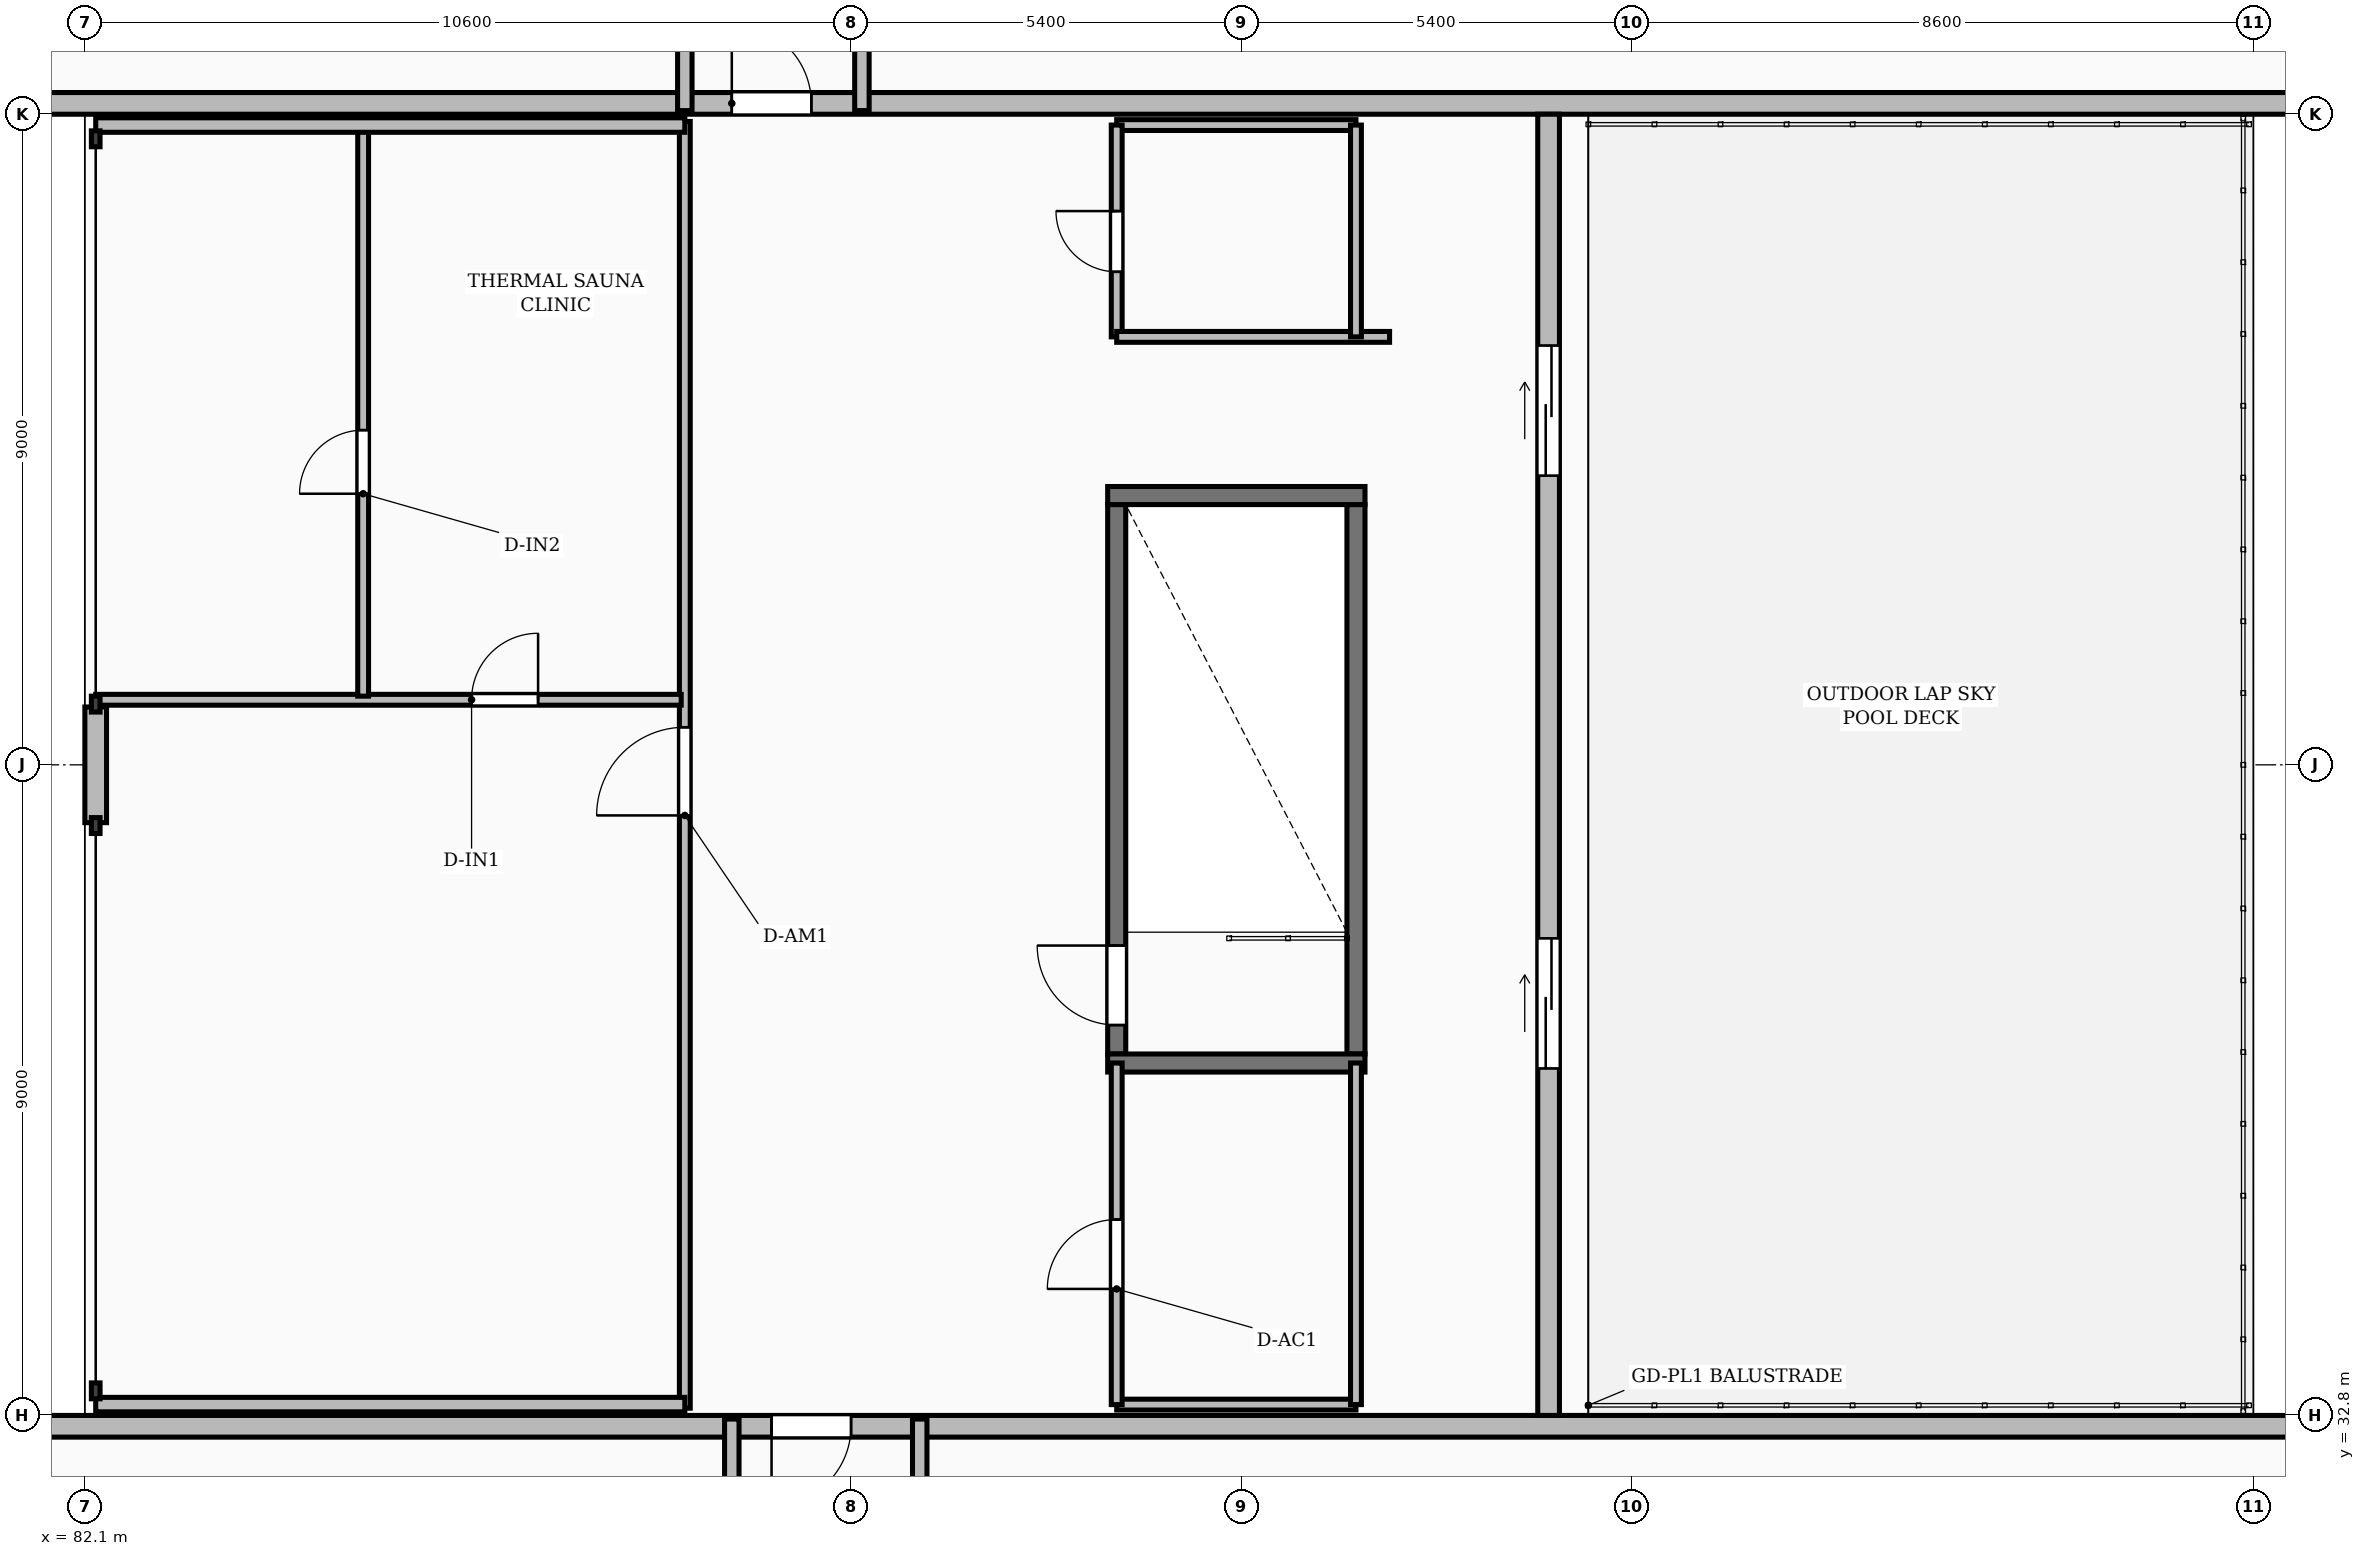
"""IFC4 building model, lengths in metres.
Left out: names, types, materials, properties, quantities, classifications, styles, units other than length and angle.
Written with IfcOpenShell. Run it as: python <this file> out.ifc"""

import sys

from ifc_helpers import new_model, si_unit, direction, frame, frame_2d, origin, place, context, subcontext, project, spatial, rectangle, extrude, element, fill, save


model = new_model("IFC4")
c1 = context("Model", 3, precision=1e-05, world=origin(), true_north=direction((0.0, 1.0)))
c2 = subcontext(c1, "Body", "Model", "MODEL_VIEW")
j1 = project(units=[si_unit("LENGTHUNIT", "METRE"), si_unit("PLANEANGLEUNIT", "RADIAN")], contexts=[c1])
p1 = place(None, origin())
s1 = spatial("IfcSite", under=j1, at=p1, CompositionType="ELEMENT")
p2 = place(p1, origin())
s2 = spatial("IfcBuilding", under=s1, at=p2, CompositionType="ELEMENT")
p3 = place(p2, frame((0.0, 0.0, 153.7)))
s3 = spatial("IfcBuildingStorey", under=s2, at=p3, CompositionType="ELEMENT", Elevation=153.7)
p4 = place(p3, frame((57.6, 50.95, 0.0), z_axis=(0.0, 0.0, 1.0), x_axis=(1.0, 0.0, 0.0)))
e1 = element("IfcWall", 1, at=p4, inside=s3, PredefinedType="STANDARD", context=c2, shape_type="SweptSolid", body=[
    extrude(rectangle(XDim=73.0, YDim=0.3, at=frame_2d((36.5, 0.0))), origin(), (0.0, 0.0, 1.0), 3.32),
])
p5 = place(p4, frame((15.225, 0.0, 0.85)))
e2 = element("IfcOpeningElement", 2, at=p5, cuts=e1, PredefinedType="OPENING", context=c2, shape_type="SweptSolid", body=[
    extrude(rectangle(XDim=1.8, YDim=1.8, at=frame_2d((0.9, 0.9))), frame((0.0, 0.16, 0.0), z_axis=(0.0, -1.0, 0.0), x_axis=(1.0, 0.0, 0.0)), (0.0, 0.0, 1.0), 0.32),
])
p6 = place(p4, frame((58.575, 0.0, 0.85)))
e3 = element("IfcOpeningElement", 3, at=p6, cuts=e1, PredefinedType="OPENING", context=c2, shape_type="SweptSolid", body=[
    extrude(rectangle(XDim=1.8, YDim=1.8, at=frame_2d((0.9, 0.9))), frame((0.0, 0.16, 0.0), z_axis=(0.0, -1.0, 0.0), x_axis=(1.0, 0.0, 0.0)), (0.0, 0.0, 1.0), 0.32),
])
p7 = place(p4, frame((33.45, 0.0, 0.0)))
e4 = element("IfcOpeningElement", 4, at=p7, cuts=e1, PredefinedType="OPENING", context=c2, shape_type="SweptSolid", body=[
    extrude(rectangle(XDim=1.1, YDim=2.1, at=frame_2d((0.55, 1.05))), frame((0.0, 0.16, 0.0), z_axis=(0.0, -1.0, 0.0), x_axis=(1.0, 0.0, 0.0)), (0.0, 0.0, 1.0), 0.32),
])
p8 = place(p3, frame((130.7, 32.65, 0.0), z_axis=(0.0, 0.0, 1.0), x_axis=(-1.0, 0.0, 0.0)))
e5 = element("IfcWall", 5, at=p8, inside=s3, PredefinedType="STANDARD", context=c2, shape_type="SweptSolid", body=[
    extrude(rectangle(XDim=58.0, YDim=0.3, at=frame_2d((29.0, 0.0))), origin(), (0.0, 0.0, 1.0), 3.32),
])
p9 = place(p8, frame((50.125, 0.0, 0.85)))
e6 = element("IfcOpeningElement", 6, at=p9, cuts=e5, PredefinedType="OPENING", context=c2, shape_type="SweptSolid", body=[
    extrude(rectangle(XDim=1.8, YDim=1.8, at=frame_2d((0.9, 0.9))), frame((0.0, 0.16, 0.0), z_axis=(0.0, -1.0, 0.0), x_axis=(1.0, 0.0, 0.0)), (0.0, 0.0, 1.0), 0.32),
])
p10 = place(p8, frame((6.775, 0.0, 0.85)))
e7 = element("IfcOpeningElement", 7, at=p10, cuts=e5, PredefinedType="OPENING", context=c2, shape_type="SweptSolid", body=[
    extrude(rectangle(XDim=1.8, YDim=1.8, at=frame_2d((0.9, 0.9))), frame((0.0, 0.16, 0.0), z_axis=(0.0, -1.0, 0.0), x_axis=(1.0, 0.0, 0.0)), (0.0, 0.0, 1.0), 0.32),
])
p11 = place(p8, frame((38.0, 0.0, 0.0)))
e8 = element("IfcOpeningElement", 8, at=p11, cuts=e5, PredefinedType="OPENING", context=c2, shape_type="SweptSolid", body=[
    extrude(rectangle(XDim=1.1, YDim=2.1, at=frame_2d((0.55, 1.05))), frame((0.0, 0.16, 0.0), z_axis=(0.0, -1.0, 0.0), x_axis=(1.0, 0.0, 0.0)), (0.0, 0.0, 1.0), 0.32),
])
p12 = place(p3, frame((82.25, 41.0, 0.0), z_axis=(0.0, 0.0, 1.0), x_axis=(0.0, 1.0, 0.0)))
e9 = element("IfcWall", 9, at=p12, inside=s3, PredefinedType="STANDARD", context=c2, shape_type="SweptSolid", body=[
    extrude(rectangle(XDim=1.6, YDim=0.3, at=frame_2d((0.8, 0.0))), origin(), (0.0, 0.0, 1.0), 2.39),
])
p13 = place(p3, frame((102.35, 32.8, 0.0), z_axis=(0.0, 0.0, 1.0), x_axis=(0.0, 1.0, 0.0)))
e10 = element("IfcWall", 10, at=p13, inside=s3, PredefinedType="STANDARD", context=c2, shape_type="SweptSolid", body=[
    extrude(rectangle(XDim=18.0, YDim=0.3, at=frame_2d((9.0, 0.0))), origin(), (0.0, 0.0, 1.0), 3.32),
])
p14 = place(p13, frame((4.8, 0.0, 0.0)))
e11 = element("IfcOpeningElement", 11, at=p14, cuts=e10, PredefinedType="OPENING", context=c2, shape_type="SweptSolid", body=[
    extrude(rectangle(XDim=1.8, YDim=2.3, at=frame_2d((0.9, 1.15))), frame((0.0, 0.16, 0.0), z_axis=(0.0, -1.0, 0.0), x_axis=(1.0, 0.0, 0.0)), (0.0, 0.0, 1.0), 0.32),
])
p15 = place(p13, frame((13.0, 0.0, 0.0)))
e12 = element("IfcOpeningElement", 12, at=p15, cuts=e10, PredefinedType="OPENING", context=c2, shape_type="SweptSolid", body=[
    extrude(rectangle(XDim=1.8, YDim=2.3, at=frame_2d((0.9, 1.15))), frame((0.0, 0.16, 0.0), z_axis=(0.0, -1.0, 0.0), x_axis=(1.0, 0.0, 0.0)), (0.0, 0.0, 1.0), 0.32),
])
for number, where, z_axis, x_axis in (
    (13, (90.4, 50.85, 0.0), (0.0, 0.0, 1.0), (0.0, 1.0, 0.0)),
    (14, (92.85, 50.85, 0.0), (0.0, 0.0, 1.0), (0.0, 1.0, 0.0)),
):
    element("IfcWall", number, at=place(p3, frame(where, z_axis=z_axis, x_axis=x_axis)), inside=s3, PredefinedType="PARTITIONING", context=c2, shape_type="SweptSolid", body=[
        extrude(rectangle(XDim=4.2, YDim=0.2, at=frame_2d((2.1, 0.0))), origin(), (0.0, 0.0, 1.0), 3.32),
    ])
p16 = place(p3, frame((91.05, 30.55, 0.0), z_axis=(0.0, 0.0, 1.0), x_axis=(0.0, 1.0, 0.0)))
e15 = element("IfcWall", 15, at=p16, inside=s3, PredefinedType="PARTITIONING", context=c2, shape_type="SweptSolid", body=[
    extrude(rectangle(XDim=2.2, YDim=0.2, at=frame_2d((1.1, 0.0))), origin(), (0.0, 0.0, 1.0), 3.32),
])
p17 = place(p3, frame((93.65, 30.55, 0.0), z_axis=(0.0, 0.0, 1.0), x_axis=(0.0, 1.0, 0.0)))
e16 = element("IfcWall", 16, at=p17, inside=s3, PredefinedType="PARTITIONING", context=c2, shape_type="SweptSolid", body=[
    extrude(rectangle(XDim=2.2, YDim=0.2, at=frame_2d((1.1, 0.0))), origin(), (0.0, 0.0, 1.0), 2.394),
])
p18 = place(p3, frame((96.375, 37.8, 0.0), z_axis=(0.0, 0.0, 1.0), x_axis=(0.0, 1.0, 0.0)))
e17 = element("IfcWall", 17, at=p18, inside=s3, PredefinedType="SHEAR", context=c2, shape_type="SweptSolid", body=[
    extrude(rectangle(XDim=7.6, YDim=0.25, at=frame_2d((3.8, 0.0))), origin(), (0.0, 0.0, 1.0), 3.6),
])
p19 = place(p18, frame((0.4, 0.0, 0.0)))
e18 = element("IfcOpeningElement", 18, at=p19, cuts=e17, PredefinedType="OPENING", context=c2, shape_type="SweptSolid", body=[
    extrude(rectangle(XDim=1.1, YDim=2.1, at=frame_2d((0.55, 1.05))), frame((0.0, 0.135, 0.0), z_axis=(0.0, -1.0, 0.0), x_axis=(1.0, 0.0, 0.0)), (0.0, 0.0, 1.0), 0.27),
])
p20 = place(p3, frame((99.685, 37.8, 0.0), z_axis=(0.0, 0.0, 1.0), x_axis=(0.0, 1.0, 0.0)))
e19 = element("IfcWall", 19, at=p20, inside=s3, PredefinedType="SHEAR", context=c2, shape_type="SweptSolid", body=[
    extrude(rectangle(XDim=7.6, YDim=0.25, at=frame_2d((3.8, 0.0))), origin(), (0.0, 0.0, 1.0), 3.6),
])
for number, where, z_axis, x_axis in (
    (20, (96.25, 37.675, 0.0), (0.0, 0.0, 1.0), (1.0, 0.0, 0.0)),
    (21, (96.25, 45.525, 0.0), (0.0, 0.0, 1.0), (1.0, 0.0, 0.0)),
):
    element("IfcWall", number, at=place(p3, frame(where, z_axis=z_axis, x_axis=x_axis)), inside=s3, PredefinedType="SHEAR", context=c2, shape_type="SweptSolid", body=[
        extrude(rectangle(XDim=3.56, YDim=0.25, at=frame_2d((1.78, 0.0))), origin(), (0.0, 0.0, 1.0), 3.6),
    ])
for number, where, z_axis, x_axis in (
    (22, (96.375, 32.95, 0.0), (0.0, 0.0, 1.0), (1.0, 0.0, 0.0)),
    (23, (96.375, 50.65, 0.0), (0.0, 0.0, 1.0), (1.0, 0.0, 0.0)),
):
    element("IfcWall", number, at=place(p3, frame(where, z_axis=z_axis, x_axis=x_axis)), inside=s3, PredefinedType="PARTITIONING", context=c2, shape_type="SweptSolid", body=[
        extrude(rectangle(XDim=3.31, YDim=0.15, at=frame_2d((1.655, 0.0))), origin(), (0.0, 0.0, 1.0), 2.7),
    ])
p21 = place(p3, frame((96.375, 32.95, 0.0), z_axis=(0.0, 0.0, 1.0), x_axis=(0.0, 1.0, 0.0)))
e24 = element("IfcWall", 24, at=p21, inside=s3, PredefinedType="PARTITIONING", context=c2, shape_type="SweptSolid", body=[
    extrude(rectangle(XDim=4.725, YDim=0.15, at=frame_2d((2.363, 0.0))), origin(), (0.0, 0.0, 1.0), 2.394),
])
p22 = place(p21, frame((1.6, 0.0, 0.0)))
e25 = element("IfcOpeningElement", 25, at=p22, cuts=e24, PredefinedType="OPENING", context=c2, shape_type="SweptSolid", body=[
    extrude(rectangle(XDim=0.96, YDim=2.1, at=frame_2d((0.48, 1.05))), frame((0.0, 0.085, 0.0), z_axis=(0.0, -1.0, 0.0), x_axis=(1.0, 0.0, 0.0)), (0.0, 0.0, 1.0), 0.17),
])
p23 = place(p3, frame((96.375, 47.72, 0.0), z_axis=(0.0, 0.0, 1.0), x_axis=(0.0, 1.0, 0.0)))
e26 = element("IfcWall", 26, at=p23, inside=s3, PredefinedType="PARTITIONING", context=c2, shape_type="SweptSolid", body=[
    extrude(rectangle(XDim=2.93, YDim=0.15, at=frame_2d((1.465, 0.0))), origin(), (0.0, 0.0, 1.0), 2.394),
])
p24 = place(p23, frame((0.9, 0.0, 0.0)))
e27 = element("IfcOpeningElement", 27, at=p24, cuts=e26, PredefinedType="OPENING", context=c2, shape_type="SweptSolid", body=[
    extrude(rectangle(XDim=0.84, YDim=2.04, at=frame_2d((0.42, 1.02))), frame((0.0, 0.085, 0.0), z_axis=(0.0, -1.0, 0.0), x_axis=(1.0, 0.0, 0.0)), (0.0, 0.0, 1.0), 0.17),
])
p25 = place(p3, frame((96.375, 47.72, 0.0), z_axis=(0.0, 0.0, 1.0), x_axis=(1.0, 0.0, 0.0)))
e28 = element("IfcWall", 28, at=p25, inside=s3, PredefinedType="PARTITIONING", context=c2, shape_type="SweptSolid", body=[
    extrude(rectangle(XDim=3.775, YDim=0.15, at=frame_2d((1.887, 0.0))), origin(), (0.0, 0.0, 1.0), 3.32),
])
p26 = place(p3, frame((99.685, 32.95, 0.0), z_axis=(0.0, 0.0, 1.0), x_axis=(0.0, 1.0, 0.0)))
e29 = element("IfcWall", 29, at=p26, inside=s3, PredefinedType="PARTITIONING", context=c2, shape_type="SweptSolid", body=[
    extrude(rectangle(XDim=4.725, YDim=0.15, at=frame_2d((2.363, 0.0))), origin(), (0.0, 0.0, 1.0), 2.394),
])
p27 = place(p3, frame((99.685, 47.72, 0.0), z_axis=(0.0, 0.0, 1.0), x_axis=(0.0, 1.0, 0.0)))
e30 = element("IfcWall", 30, at=p27, inside=s3, PredefinedType="PARTITIONING", context=c2, shape_type="SweptSolid", body=[
    extrude(rectangle(XDim=2.93, YDim=0.15, at=frame_2d((1.465, 0.0))), origin(), (0.0, 0.0, 1.0), 2.394),
])
p28 = place(p3, frame((90.4, 32.9, 0.0), z_axis=(0.0, 0.0, 1.0), x_axis=(0.0, 1.0, 0.0)))
e31 = element("IfcWall", 31, at=p28, inside=s3, PredefinedType="PARTITIONING", context=c2, shape_type="SweptSolid", body=[
    extrude(rectangle(XDim=17.8, YDim=0.15, at=frame_2d((8.9, 0.0))), origin(), (0.0, 0.0, 1.0), 3.32),
])
p29 = place(p28, frame((8.2, 0.0, 0.0)))
e32 = element("IfcOpeningElement", 32, at=p29, cuts=e31, PredefinedType="OPENING", context=c2, shape_type="SweptSolid", body=[
    extrude(rectangle(XDim=1.22, YDim=2.18, at=frame_2d((0.61, 1.09))), frame((0.0, 0.085, 0.0), z_axis=(0.0, -1.0, 0.0), x_axis=(1.0, 0.0, 0.0)), (0.0, 0.0, 1.0), 0.17),
])
p30 = place(p3, frame((82.25, 42.7, 0.0), z_axis=(0.0, 0.0, 1.0), x_axis=(1.0, 0.0, 0.0)))
e33 = element("IfcWall", 33, at=p30, inside=s3, PredefinedType="PARTITIONING", context=c2, shape_type="SweptSolid", body=[
    extrude(rectangle(XDim=8.1, YDim=0.15, at=frame_2d((4.05, 0.0))), origin(), (0.0, 0.0, 1.0), 3.32),
])
p31 = place(p30, frame((5.2, 0.0, 0.0)))
e34 = element("IfcOpeningElement", 34, at=p31, cuts=e33, PredefinedType="OPENING", context=c2, shape_type="SweptSolid", body=[
    extrude(rectangle(XDim=0.92, YDim=2.08, at=frame_2d((0.46, 1.04))), frame((0.0, 0.085, 0.0), z_axis=(0.0, -1.0, 0.0), x_axis=(1.0, 0.0, 0.0)), (0.0, 0.0, 1.0), 0.17),
])
p32 = place(p3, frame((85.95, 42.75, 0.0), z_axis=(0.0, 0.0, 1.0), x_axis=(0.0, 1.0, 0.0)))
e35 = element("IfcWall", 35, at=p32, inside=s3, PredefinedType="PARTITIONING", context=c2, shape_type="SweptSolid", body=[
    extrude(rectangle(XDim=7.9, YDim=0.15, at=frame_2d((3.95, 0.0))), origin(), (0.0, 0.0, 1.0), 3.32),
])
p33 = place(p32, frame((2.8, 0.0, 0.0)))
e36 = element("IfcOpeningElement", 36, at=p33, cuts=e35, PredefinedType="OPENING", context=c2, shape_type="SweptSolid", body=[
    extrude(rectangle(XDim=0.88, YDim=2.06, at=frame_2d((0.44, 1.03))), frame((0.0, 0.085, 0.0), z_axis=(0.0, -1.0, 0.0), x_axis=(1.0, 0.0, 0.0)), (0.0, 0.0, 1.0), 0.17),
])
for number, where, z_axis, x_axis in (
    (37, (82.25, 50.65, 0.0), (0.0, 0.0, 1.0), (1.0, 0.0, 0.0)),
    (38, (82.25, 32.95, 0.0), (0.0, 0.0, 1.0), (1.0, 0.0, 0.0)),
):
    element("IfcWall", number, at=place(p3, frame(where, z_axis=z_axis, x_axis=x_axis)), inside=s3, PredefinedType="PARTITIONING", context=c2, shape_type="SweptSolid", body=[
        extrude(rectangle(XDim=8.15, YDim=0.2, at=frame_2d((4.075, 0.0))), origin(), (0.0, 0.0, 1.0), 2.7),
    ])
p34 = place(p7, origin())
e39 = element("IfcDoor", 39, at=p34, inside=s3, OperationType="SINGLE_SWING_LEFT", PredefinedType="DOOR", context=c2, shape_type="SweptSolid", body=[
    extrude(rectangle(XDim=1.1, YDim=2.1, at=frame_2d((0.55, 1.05))), frame((0.0, 0.025, 0.0), z_axis=(0.0, -1.0, 0.0), x_axis=(1.0, 0.0, 0.0)), (0.0, 0.0, 1.0), 0.05),
])
fill(e4, e39)
p35 = place(p11, origin())
e40 = element("IfcDoor", 40, at=p35, inside=s3, OperationType="SINGLE_SWING_RIGHT", PredefinedType="DOOR", context=c2, shape_type="SweptSolid", body=[
    extrude(rectangle(XDim=1.1, YDim=2.1, at=frame_2d((0.55, 1.05))), frame((0.0, 0.025, 0.0), z_axis=(0.0, -1.0, 0.0), x_axis=(1.0, 0.0, 0.0)), (0.0, 0.0, 1.0), 0.05),
])
fill(e8, e40)
p36 = place(p14, origin())
e41 = element("IfcDoor", 41, at=p36, inside=s3, OperationType="DOUBLE_DOOR_SLIDING", PredefinedType="DOOR", context=c2, shape_type="SweptSolid", body=[
    extrude(rectangle(XDim=1.8, YDim=2.3, at=frame_2d((0.9, 1.15))), frame((0.0, 0.025, 0.0), z_axis=(0.0, -1.0, 0.0), x_axis=(1.0, 0.0, 0.0)), (0.0, 0.0, 1.0), 0.05),
])
fill(e11, e41)
p37 = place(p15, origin())
e42 = element("IfcDoor", 42, at=p37, inside=s3, OperationType="DOUBLE_DOOR_SLIDING", PredefinedType="DOOR", context=c2, shape_type="SweptSolid", body=[
    extrude(rectangle(XDim=1.8, YDim=2.3, at=frame_2d((0.9, 1.15))), frame((0.0, 0.025, 0.0), z_axis=(0.0, -1.0, 0.0), x_axis=(1.0, 0.0, 0.0)), (0.0, 0.0, 1.0), 0.05),
])
fill(e12, e42)
p38 = place(p19, origin())
e43 = element("IfcDoor", 43, at=p38, inside=s3, OperationType="SINGLE_SWING_RIGHT", PredefinedType="DOOR", context=c2, shape_type="SweptSolid", body=[
    extrude(rectangle(XDim=1.1, YDim=2.1, at=frame_2d((0.55, 1.05))), frame((0.0, 0.025, 0.0), z_axis=(0.0, -1.0, 0.0), x_axis=(1.0, 0.0, 0.0)), (0.0, 0.0, 1.0), 0.05),
])
fill(e18, e43)
p39 = place(p22, origin())
e44 = element("IfcDoor", 44, at=p39, inside=s3, OperationType="SINGLE_SWING_LEFT", PredefinedType="DOOR", context=c2, shape_type="SweptSolid", body=[
    extrude(rectangle(XDim=0.96, YDim=2.1, at=frame_2d((0.48, 1.05))), frame((0.0, 0.025, 0.0), z_axis=(0.0, -1.0, 0.0), x_axis=(1.0, 0.0, 0.0)), (0.0, 0.0, 1.0), 0.05),
])
fill(e25, e44)
p40 = place(p24, origin())
e45 = element("IfcDoor", 45, at=p40, inside=s3, OperationType="SINGLE_SWING_RIGHT", PredefinedType="DOOR", context=c2, shape_type="SweptSolid", body=[
    extrude(rectangle(XDim=0.84, YDim=2.04, at=frame_2d((0.42, 1.02))), frame((0.0, 0.025, 0.0), z_axis=(0.0, -1.0, 0.0), x_axis=(1.0, 0.0, 0.0)), (0.0, 0.0, 1.0), 0.05),
])
fill(e27, e45)
p41 = place(p29, origin())
e46 = element("IfcDoor", 46, at=p41, inside=s3, OperationType="SINGLE_SWING_LEFT", PredefinedType="DOOR", context=c2, shape_type="SweptSolid", body=[
    extrude(rectangle(XDim=1.22, YDim=2.18, at=frame_2d((0.61, 1.09))), frame((0.0, 0.025, 0.0), z_axis=(0.0, -1.0, 0.0), x_axis=(1.0, 0.0, 0.0)), (0.0, 0.0, 1.0), 0.05),
])
fill(e32, e46)
p42 = place(p31, origin())
e47 = element("IfcDoor", 47, at=p42, inside=s3, OperationType="SINGLE_SWING_RIGHT", PredefinedType="DOOR", context=c2, shape_type="SweptSolid", body=[
    extrude(rectangle(XDim=0.92, YDim=2.08, at=frame_2d((0.46, 1.04))), frame((0.0, 0.025, 0.0), z_axis=(0.0, -1.0, 0.0), x_axis=(1.0, 0.0, 0.0)), (0.0, 0.0, 1.0), 0.05),
])
fill(e34, e47)
p43 = place(p33, origin())
e48 = element("IfcDoor", 48, at=p43, inside=s3, OperationType="SINGLE_SWING_LEFT", PredefinedType="DOOR", context=c2, shape_type="SweptSolid", body=[
    extrude(rectangle(XDim=0.88, YDim=2.06, at=frame_2d((0.44, 1.03))), frame((0.0, 0.025, 0.0), z_axis=(0.0, -1.0, 0.0), x_axis=(1.0, 0.0, 0.0)), (0.0, 0.0, 1.0), 0.05),
])
fill(e36, e48)
save(model, sys.argv[1])
